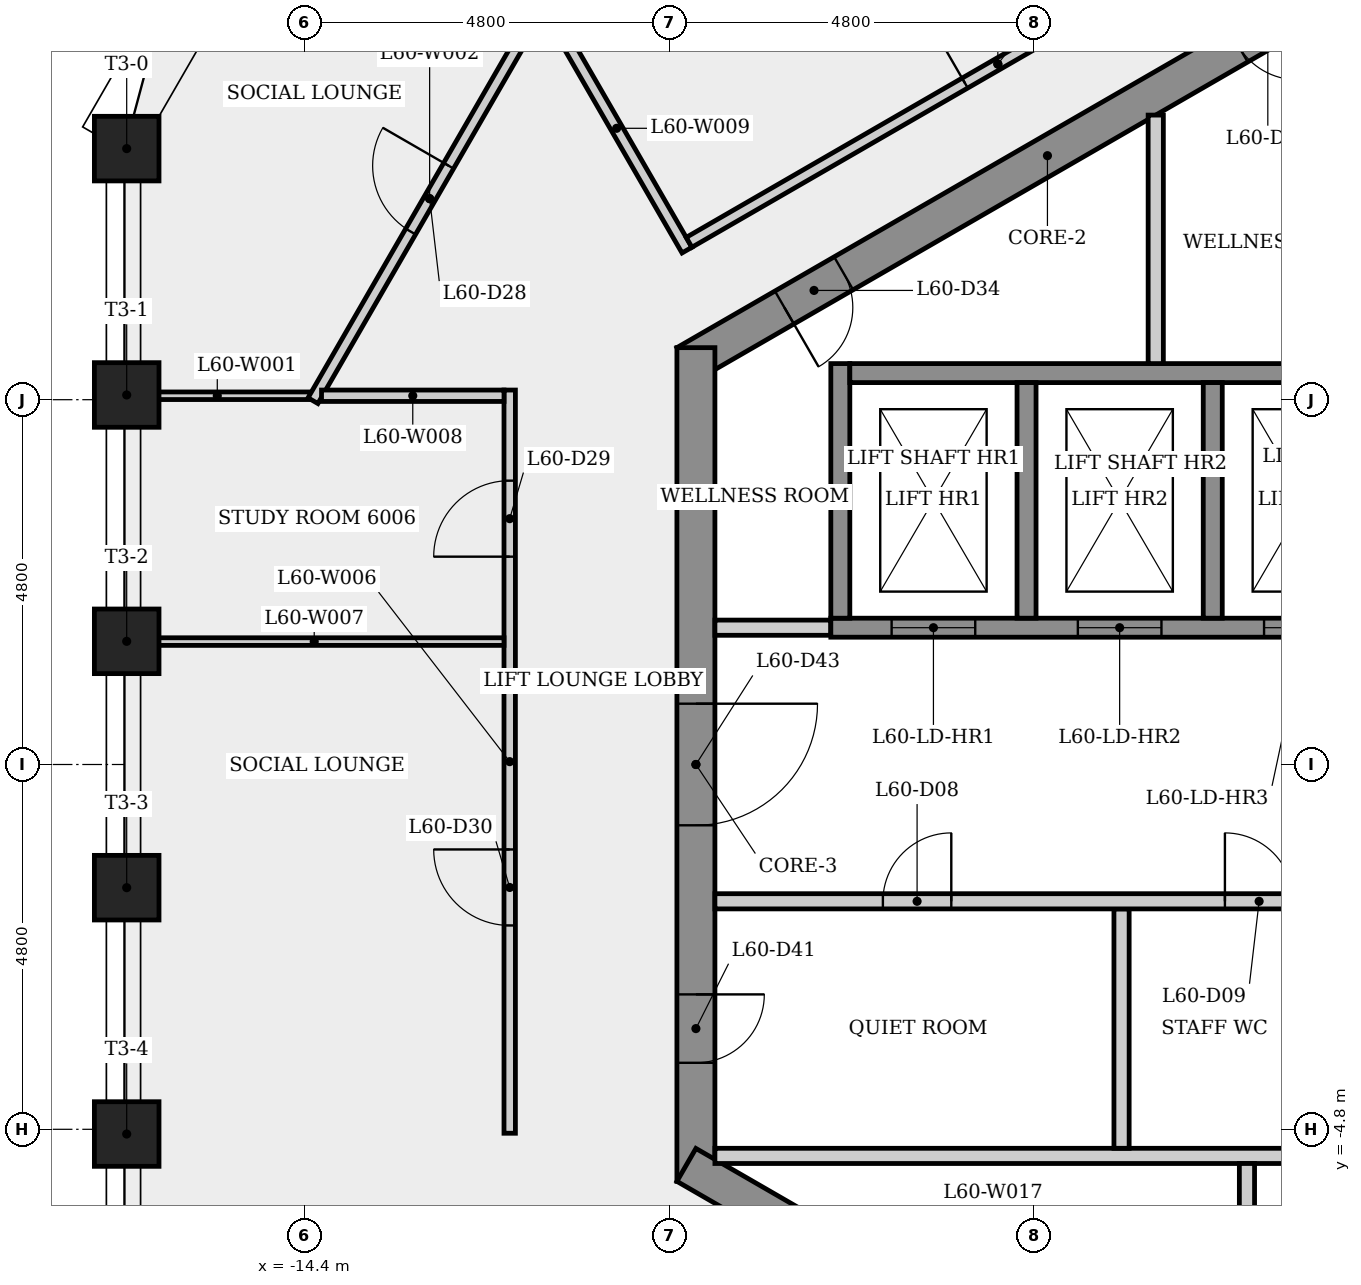
"""IFC4 building model, lengths in metres.
Left out: names, types, materials, properties, quantities, classifications, styles, units other than length and angle.
Written with IfcOpenShell. Run it as: python <this file> out.ifc"""

import sys

from ifc_helpers import new_model, si_unit, direction, frame, frame_2d, origin, origin_2d, place, context, subcontext, project, spatial, rectangle, extrude, element, fill, save


model = new_model("IFC4")
c1 = context("Model", 3, precision=1e-05, world=origin(), true_north=direction((0.0, 1.0)))
c2 = subcontext(c1, "Body", "Model", "MODEL_VIEW")
j1 = project(units=[si_unit("LENGTHUNIT", "METRE"), si_unit("PLANEANGLEUNIT", "RADIAN")], contexts=[c1])
p1 = place(None, origin())
s1 = spatial("IfcSite", under=j1, at=p1, CompositionType="ELEMENT")
p2 = place(p1, origin())
s2 = spatial("IfcBuilding", under=s1, at=p2, CompositionType="ELEMENT")
p3 = place(p2, frame((0.0, 0.0, 225.7)))
s3 = spatial("IfcBuildingStorey", under=s2, at=p3, CompositionType="ELEMENT", Elevation=225.7)
p4 = place(p3, frame((0.125, 10.753, 0.0), z_axis=(0.0, 0.0, 1.0), x_axis=(-0.866023993627, -0.500002442456, 0.0)))
e1 = element("IfcWall", 1, at=p4, inside=s3, PredefinedType="SHEAR", context=c2, shape_type="SweptSolid", body=[
    extrude(rectangle(XDim=10.97, YDim=0.5, at=frame_2d((5.485, 0.0))), origin(), (0.0, 0.0, 1.0), 3.4),
])
p5 = place(p4, frame((8.581, 0.0, 0.0)))
e2 = element("IfcOpeningElement", 2, at=p5, cuts=e1, PredefinedType="OPENING", context=c2, shape_type="SweptSolid", body=[
    extrude(rectangle(XDim=0.9, YDim=2.1, at=frame_2d((0.45, 1.05))), frame((0.0, 0.26, 0.0), z_axis=(0.0, -1.0, 0.0), x_axis=(1.0, 0.0, 0.0)), (0.0, 0.0, 1.0), 0.52),
])
p6 = place(p4, frame((1.687, 0.0, 0.0)))
e3 = element("IfcOpeningElement", 3, at=p6, cuts=e1, PredefinedType="OPENING", context=c2, shape_type="SweptSolid", body=[
    extrude(rectangle(XDim=0.9, YDim=2.1, at=frame_2d((0.45, 1.05))), frame((0.0, 0.26, 0.0), z_axis=(0.0, -1.0, 0.0), x_axis=(1.0, 0.0, 0.0)), (0.0, 0.0, 1.0), 0.52),
])
p7 = place(p3, frame((-9.25, 5.485, 0.0), z_axis=(0.0, 0.0, 1.0), x_axis=(0.0, -1.0, 0.0)))
e4 = element("IfcWall", 4, at=p7, inside=s3, PredefinedType="SHEAR", context=c2, shape_type="SweptSolid", body=[
    extrude(rectangle(XDim=10.97, YDim=0.5, at=frame_2d((5.485, 0.0))), origin(), (0.0, 0.0, 1.0), 3.4),
])
p8 = place(p7, frame((8.51, 0.0, 0.0)))
e5 = element("IfcOpeningElement", 5, at=p8, cuts=e4, PredefinedType="OPENING", context=c2, shape_type="SweptSolid", body=[
    extrude(rectangle(XDim=0.9, YDim=2.1, at=frame_2d((0.45, 1.05))), frame((0.0, 0.26, 0.0), z_axis=(0.0, -1.0, 0.0), x_axis=(1.0, 0.0, 0.0)), (0.0, 0.0, 1.0), 0.52),
])
p9 = place(p7, frame((4.685, 0.0, 0.0)))
e6 = element("IfcOpeningElement", 6, at=p9, cuts=e4, PredefinedType="OPENING", context=c2, shape_type="SweptSolid", body=[
    extrude(rectangle(XDim=1.6, YDim=2.1, at=frame_2d((0.8, 1.05))), frame((0.0, 0.26, 0.0), z_axis=(0.0, -1.0, 0.0), x_axis=(1.0, 0.0, 0.0)), (0.0, 0.0, 1.0), 0.52),
])
p10 = place(p3, frame((-9.375, -5.268, 0.0), z_axis=(0.0, 0.0, 1.0), x_axis=(0.866023993627, -0.500002442456, 0.0)))
e7 = element("IfcWall", 7, at=p10, inside=s3, PredefinedType="SHEAR", context=c2, shape_type="SweptSolid", body=[
    extrude(rectangle(XDim=10.97, YDim=0.5, at=frame_2d((5.485, 0.0))), origin(), (0.0, 0.0, 1.0), 3.4),
])
p11 = place(p10, frame((3.857, 0.0, 0.0)))
e8 = element("IfcOpeningElement", 8, at=p11, cuts=e7, PredefinedType="OPENING", context=c2, shape_type="SweptSolid", body=[
    extrude(rectangle(XDim=0.9, YDim=2.1, at=frame_2d((0.45, 1.05))), frame((0.0, 0.26, 0.0), z_axis=(0.0, -1.0, 0.0), x_axis=(1.0, 0.0, 0.0)), (0.0, 0.0, 1.0), 0.52),
])
p12 = place(p10, frame((9.076, 0.0, 0.0)))
e9 = element("IfcOpeningElement", 9, at=p12, cuts=e7, PredefinedType="OPENING", context=c2, shape_type="SweptSolid", body=[
    extrude(rectangle(XDim=0.9, YDim=2.1, at=frame_2d((0.45, 1.05))), frame((0.0, 0.26, 0.0), z_axis=(0.0, -1.0, 0.0), x_axis=(1.0, 0.0, 0.0)), (0.0, 0.0, 1.0), 0.52),
])
for number, where, z_axis, x_axis in (
    (10, (-16.739, 8.104, 0.0), (0.0, 0.0, 1.0), (-1.0, 0.0, 0.0)),
    (11, (-16.739, 4.862, 0.0), (0.0, 0.0, 1.0), (-1.0, 0.0, 0.0)),
    (12, (-16.739, 1.621, 0.0), (0.0, 0.0, 1.0), (-1.0, 0.0, 0.0)),
    (13, (-16.739, -1.621, 0.0), (0.0, 0.0, 1.0), (-1.0, 0.0, 0.0)),
    (14, (-16.739, -4.862, 0.0), (0.0, 0.0, 1.0), (-1.0, 0.0, 0.0)),
):
    element("IfcColumn", number, at=place(p3, frame(where, z_axis=z_axis, x_axis=x_axis)), inside=s3, PredefinedType="COLUMN", context=c2, shape_type="SweptSolid", body=[
        extrude(rectangle(XDim=0.85, YDim=0.85, at=origin_2d()), origin(), (0.0, 0.0, 1.0), 3.4),
    ])
p13 = place(p3, frame((-14.326, 4.852, 0.0), z_axis=(0.0, 0.0, 1.0), x_axis=(-1.0, 0.0, 0.0)))
e15 = element("IfcWall", 15, at=p13, inside=s3, PredefinedType="PARTITIONING", context=c2, shape_type="SweptSolid", body=[
    extrude(rectangle(XDim=2.443, YDim=0.1, at=frame_2d((1.222, 0.0))), origin(), (0.0, 0.0, 1.0), 3.05),
])
p14 = place(p3, frame((-14.288, 4.787, 0.0), z_axis=(0.0, 0.0, 1.0), x_axis=(0.499984068593, 0.866034601591, 0.0)))
e16 = element("IfcWall", 16, at=p14, inside=s3, PredefinedType="PARTITIONING", context=c2, shape_type="SweptSolid", body=[
    extrude(rectangle(XDim=6.139, YDim=0.15, at=frame_2d((3.07, 0.0))), origin(), (0.0, 0.0, 1.0), 3.05),
])
p15 = place(p14, frame((2.57, 0.0, 0.0)))
e17 = element("IfcOpeningElement", 17, at=p15, cuts=e16, PredefinedType="OPENING", context=c2, shape_type="SweptSolid", body=[
    extrude(rectangle(XDim=1.0, YDim=2.1, at=frame_2d((0.5, 1.05))), frame((0.0, 0.085, 0.0), z_axis=(0.0, -1.0, 0.0), x_axis=(1.0, 0.0, 0.0)), (0.0, 0.0, 1.0), 0.17),
])
p16 = place(p3, frame((-11.7, -4.852, 0.0), z_axis=(0.0, 0.0, 1.0), x_axis=(0.0, 1.0, 0.0)))
e18 = element("IfcWall", 18, at=p16, inside=s3, PredefinedType="PARTITIONING", context=c2, shape_type="SweptSolid", body=[
    extrude(rectangle(XDim=9.779, YDim=0.15, at=frame_2d((4.889, 0.0))), origin(), (0.0, 0.0, 1.0), 3.05),
])
p17 = place(p16, frame((7.586, 0.0, 0.0)))
e19 = element("IfcOpeningElement", 19, at=p17, cuts=e18, PredefinedType="OPENING", context=c2, shape_type="SweptSolid", body=[
    extrude(rectangle(XDim=1.0, YDim=2.1, at=frame_2d((0.5, 1.05))), frame((0.0, 0.085, 0.0), z_axis=(0.0, -1.0, 0.0), x_axis=(1.0, 0.0, 0.0)), (0.0, 0.0, 1.0), 0.17),
])
p18 = place(p16, frame((2.734, 0.0, 0.0)))
e20 = element("IfcOpeningElement", 20, at=p18, cuts=e18, PredefinedType="OPENING", context=c2, shape_type="SweptSolid", body=[
    extrude(rectangle(XDim=1.0, YDim=2.1, at=frame_2d((0.5, 1.05))), frame((0.0, 0.085, 0.0), z_axis=(0.0, -1.0, 0.0), x_axis=(1.0, 0.0, 0.0)), (0.0, 0.0, 1.0), 0.17),
])
p19 = place(p3, frame((-11.775, 1.617, 0.0), z_axis=(0.0, 0.0, 1.0), x_axis=(-1.0, 0.0, 0.0)))
e21 = element("IfcWall", 21, at=p19, inside=s3, PredefinedType="PARTITIONING", context=c2, shape_type="SweptSolid", body=[
    extrude(rectangle(XDim=4.994, YDim=0.1, at=frame_2d((2.497, 0.0))), origin(), (0.0, 0.0, 1.0), 3.05),
])
p20 = place(p3, frame((-11.775, 4.852, 0.0), z_axis=(0.0, 0.0, 1.0), x_axis=(-1.0, 0.0, 0.0)))
e22 = element("IfcWall", 22, at=p20, inside=s3, PredefinedType="PARTITIONING", context=c2, shape_type="SweptSolid", body=[
    extrude(rectangle(XDim=2.401, YDim=0.15, at=frame_2d((1.2, 0.0))), origin(), (0.0, 0.0, 1.0), 3.05),
])
p21 = place(p3, frame((-11.219, 9.974, 0.0), z_axis=(0.0, 0.0, 1.0), x_axis=(0.500040243496, -0.866002167944, 0.0)))
e23 = element("IfcWall", 23, at=p21, inside=s3, PredefinedType="PARTITIONING", context=c2, shape_type="SweptSolid", body=[
    extrude(rectangle(XDim=3.702, YDim=0.15, at=frame_2d((1.851, 0.0))), origin(), (0.0, 0.0, 1.0), 3.05),
])
p22 = place(p3, frame((-9.34, 6.87, 0.0), z_axis=(0.0, 0.0, 1.0), x_axis=(0.866023086118, 0.500004014295, 0.0)))
e24 = element("IfcWall", 24, at=p22, inside=s3, PredefinedType="PARTITIONING", context=c2, shape_type="SweptSolid", body=[
    extrude(rectangle(XDim=9.382, YDim=0.15, at=frame_2d((4.691, 0.0))), origin(), (0.0, 0.0, 1.0), 3.05),
])
p23 = place(p22, frame((4.191, 0.0, 0.0)))
e25 = element("IfcOpeningElement", 25, at=p23, cuts=e24, PredefinedType="OPENING", context=c2, shape_type="SweptSolid", body=[
    extrude(rectangle(XDim=1.0, YDim=2.1, at=frame_2d((0.5, 1.05))), frame((0.0, 0.085, 0.0), z_axis=(0.0, -1.0, 0.0), x_axis=(1.0, 0.0, 0.0)), (0.0, 0.0, 1.0), 0.17),
])
p24 = place(p3, frame((-9.0, 1.8, 0.0), z_axis=(0.0, 0.0, 1.0), x_axis=(1.0, 0.0, 0.0)))
e26 = element("IfcWall", 26, at=p24, inside=s3, PredefinedType="PARTITIONING", context=c2, shape_type="SweptSolid", body=[
    extrude(rectangle(XDim=1.525, YDim=0.2, at=frame_2d((0.763, 0.0))), origin(), (0.0, 0.0, 1.0), 3.05),
])
p25 = place(p3, frame((-9.0, -5.15, 0.0), z_axis=(0.0, 0.0, 1.0), x_axis=(1.0, 0.0, 0.0)))
e27 = element("IfcWall", 27, at=p25, inside=s3, PredefinedType="PARTITIONING", context=c2, shape_type="SweptSolid", body=[
    extrude(rectangle(XDim=11.325, YDim=0.2, at=frame_2d((5.663, 0.0))), origin(), (0.0, 0.0, 1.0), 3.05),
])
p26 = place(p3, frame((-7.475, 1.8, 0.0), z_axis=(0.0, 0.0, 1.0), x_axis=(1.0, 0.0, 0.0)))
e28 = element("IfcWall", 28, at=p26, inside=s3, PredefinedType="SHEAR", context=c2, shape_type="SweptSolid", body=[
    extrude(rectangle(XDim=14.95, YDim=0.25, at=frame_2d((7.475, 0.0))), origin(), (0.0, 0.0, 1.0), 3.05),
])
p27 = place(p26, frame((0.8, 0.0, 0.0)))
e29 = element("IfcOpeningElement", 29, at=p27, cuts=e28, PredefinedType="OPENING", context=c2, shape_type="SweptSolid", body=[
    extrude(rectangle(XDim=1.1, YDim=2.1, at=frame_2d((0.55, 1.05))), frame((0.0, 0.135, 0.0), z_axis=(0.0, -1.0, 0.0), x_axis=(1.0, 0.0, 0.0)), (0.0, 0.0, 1.0), 0.27),
])
p28 = place(p26, frame((3.25, 0.0, 0.0)))
e30 = element("IfcOpeningElement", 30, at=p28, cuts=e28, PredefinedType="OPENING", context=c2, shape_type="SweptSolid", body=[
    extrude(rectangle(XDim=1.1, YDim=2.1, at=frame_2d((0.55, 1.05))), frame((0.0, 0.135, 0.0), z_axis=(0.0, -1.0, 0.0), x_axis=(1.0, 0.0, 0.0)), (0.0, 0.0, 1.0), 0.27),
])
p29 = place(p26, frame((5.7, 0.0, 0.0)))
e31 = element("IfcOpeningElement", 31, at=p29, cuts=e28, PredefinedType="OPENING", context=c2, shape_type="SweptSolid", body=[
    extrude(rectangle(XDim=1.1, YDim=2.1, at=frame_2d((0.55, 1.05))), frame((0.0, 0.135, 0.0), z_axis=(0.0, -1.0, 0.0), x_axis=(1.0, 0.0, 0.0)), (0.0, 0.0, 1.0), 0.27),
])
p30 = place(p26, frame((8.15, 0.0, 0.0)))
e32 = element("IfcOpeningElement", 32, at=p30, cuts=e28, PredefinedType="OPENING", context=c2, shape_type="SweptSolid", body=[
    extrude(rectangle(XDim=1.1, YDim=2.1, at=frame_2d((0.55, 1.05))), frame((0.0, 0.135, 0.0), z_axis=(0.0, -1.0, 0.0), x_axis=(1.0, 0.0, 0.0)), (0.0, 0.0, 1.0), 0.27),
])
p31 = place(p26, frame((10.6, 0.0, 0.0)))
e33 = element("IfcOpeningElement", 33, at=p31, cuts=e28, PredefinedType="OPENING", context=c2, shape_type="SweptSolid", body=[
    extrude(rectangle(XDim=1.1, YDim=2.1, at=frame_2d((0.55, 1.05))), frame((0.0, 0.135, 0.0), z_axis=(0.0, -1.0, 0.0), x_axis=(1.0, 0.0, 0.0)), (0.0, 0.0, 1.0), 0.27),
])
p32 = place(p26, frame((13.05, 0.0, 0.0)))
e34 = element("IfcOpeningElement", 34, at=p32, cuts=e28, PredefinedType="OPENING", context=c2, shape_type="SweptSolid", body=[
    extrude(rectangle(XDim=1.1, YDim=2.1, at=frame_2d((0.55, 1.05))), frame((0.0, 0.135, 0.0), z_axis=(0.0, -1.0, 0.0), x_axis=(1.0, 0.0, 0.0)), (0.0, 0.0, 1.0), 0.27),
])
p33 = place(p3, frame((-7.35, 1.925, 0.0), z_axis=(0.0, 0.0, 1.0), x_axis=(0.0, 1.0, 0.0)))
e35 = element("IfcWall", 35, at=p33, inside=s3, PredefinedType="SHEAR", context=c2, shape_type="SweptSolid", body=[
    extrude(rectangle(XDim=3.35, YDim=0.25, at=frame_2d((1.675, 0.0))), origin(), (0.0, 0.0, 1.0), 3.05),
])
p34 = place(p3, frame((-7.225, 5.15, 0.0), z_axis=(0.0, 0.0, 1.0), x_axis=(1.0, 0.0, 0.0)))
e36 = element("IfcWall", 36, at=p34, inside=s3, PredefinedType="SHEAR", context=c2, shape_type="SweptSolid", body=[
    extrude(rectangle(XDim=14.7, YDim=0.25, at=frame_2d((7.35, 0.0))), origin(), (0.0, 0.0, 1.0), 3.05),
])
p35 = place(p3, frame((-4.9, 5.025, 0.0), z_axis=(0.0, 0.0, 1.0), x_axis=(0.0, -1.0, 0.0)))
e37 = element("IfcWall", 37, at=p35, inside=s3, PredefinedType="SHEAR", context=c2, shape_type="SweptSolid", body=[
    extrude(rectangle(XDim=3.1, YDim=0.25, at=frame_2d((1.55, 0.0))), origin(), (0.0, 0.0, 1.0), 3.4),
])
p36 = place(p3, frame((-3.65, -1.9, 0.0), z_axis=(0.0, 0.0, 1.0), x_axis=(0.0, -1.0, 0.0)))
e38 = element("IfcWall", 38, at=p36, inside=s3, PredefinedType="PARTITIONING", context=c2, shape_type="SweptSolid", body=[
    extrude(rectangle(XDim=3.15, YDim=0.2, at=frame_2d((1.575, 0.0))), origin(), (0.0, 0.0, 1.0), 3.05),
])
p37 = place(p3, frame((-9.0, -1.8, 0.0), z_axis=(0.0, 0.0, 1.0), x_axis=(1.0, 0.0, 0.0)))
e39 = element("IfcWall", 39, at=p37, inside=s3, PredefinedType="PARTITIONING", context=c2, shape_type="SweptSolid", body=[
    extrude(rectangle(XDim=11.325, YDim=0.2, at=frame_2d((5.663, 0.0))), origin(), (0.0, 0.0, 1.0), 3.05),
])
p38 = place(p37, frame((2.21, 0.0, 0.0)))
e40 = element("IfcOpeningElement", 40, at=p38, cuts=e39, PredefinedType="OPENING", context=c2, shape_type="SweptSolid", body=[
    extrude(rectangle(XDim=0.9, YDim=2.1, at=frame_2d((0.45, 1.05))), frame((0.0, 0.11, 0.0), z_axis=(0.0, -1.0, 0.0), x_axis=(1.0, 0.0, 0.0)), (0.0, 0.0, 1.0), 0.22),
])
p39 = place(p37, frame((6.71, 0.0, 0.0)))
e41 = element("IfcOpeningElement", 41, at=p39, cuts=e39, PredefinedType="OPENING", context=c2, shape_type="SweptSolid", body=[
    extrude(rectangle(XDim=0.9, YDim=2.1, at=frame_2d((0.45, 1.05))), frame((0.0, 0.11, 0.0), z_axis=(0.0, -1.0, 0.0), x_axis=(1.0, 0.0, 0.0)), (0.0, 0.0, 1.0), 0.22),
])
p40 = place(p37, frame((9.713, 0.0, 0.0)))
e42 = element("IfcOpeningElement", 42, at=p40, cuts=e39, PredefinedType="OPENING", context=c2, shape_type="SweptSolid", body=[
    extrude(rectangle(XDim=0.9, YDim=2.1, at=frame_2d((0.45, 1.05))), frame((0.0, 0.11, 0.0), z_axis=(0.0, -1.0, 0.0), x_axis=(1.0, 0.0, 0.0)), (0.0, 0.0, 1.0), 0.22),
])
p41 = place(p3, frame((-3.2, 8.545, 0.0), z_axis=(0.0, 0.0, 1.0), x_axis=(0.0, -1.0, 0.0)))
e43 = element("IfcWall", 43, at=p41, inside=s3, PredefinedType="PARTITIONING", context=c2, shape_type="SweptSolid", body=[
    extrude(rectangle(XDim=3.27, YDim=0.2, at=frame_2d((1.635, 0.0))), origin(), (0.0, 0.0, 1.0), 3.05),
])
p42 = place(p3, frame((-2.45, 5.025, 0.0), z_axis=(0.0, 0.0, 1.0), x_axis=(0.0, -1.0, 0.0)))
e44 = element("IfcWall", 44, at=p42, inside=s3, PredefinedType="SHEAR", context=c2, shape_type="SweptSolid", body=[
    extrude(rectangle(XDim=3.1, YDim=0.25, at=frame_2d((1.55, 0.0))), origin(), (0.0, 0.0, 1.0), 3.4),
])
p43 = place(p3, frame((-2.0, -5.25, 0.0), z_axis=(0.0, 0.0, 1.0), x_axis=(0.0, -1.0, 0.0)))
e45 = element("IfcWall", 45, at=p43, inside=s3, PredefinedType="PARTITIONING", context=c2, shape_type="SweptSolid", body=[
    extrude(rectangle(XDim=3.988, YDim=0.2, at=frame_2d((1.994, 0.0))), origin(), (0.0, 0.0, 1.0), 3.05),
])
p44 = place(p27, origin())
e46 = element("IfcDoor", 46, at=p44, inside=s3, OperationType="SLIDING_TO_LEFT", PredefinedType="DOOR", context=c2, shape_type="SweptSolid", body=[
    extrude(rectangle(XDim=1.1, YDim=2.1, at=frame_2d((0.55, 1.05))), frame((0.0, 0.025, 0.0), z_axis=(0.0, -1.0, 0.0), x_axis=(1.0, 0.0, 0.0)), (0.0, 0.0, 1.0), 0.05),
])
fill(e29, e46)
p45 = place(p28, origin())
e47 = element("IfcDoor", 47, at=p45, inside=s3, OperationType="SLIDING_TO_LEFT", PredefinedType="DOOR", context=c2, shape_type="SweptSolid", body=[
    extrude(rectangle(XDim=1.1, YDim=2.1, at=frame_2d((0.55, 1.05))), frame((0.0, 0.025, 0.0), z_axis=(0.0, -1.0, 0.0), x_axis=(1.0, 0.0, 0.0)), (0.0, 0.0, 1.0), 0.05),
])
fill(e30, e47)
p46 = place(p29, origin())
e48 = element("IfcDoor", 48, at=p46, inside=s3, OperationType="SLIDING_TO_LEFT", PredefinedType="DOOR", context=c2, shape_type="SweptSolid", body=[
    extrude(rectangle(XDim=1.1, YDim=2.1, at=frame_2d((0.55, 1.05))), frame((0.0, 0.025, 0.0), z_axis=(0.0, -1.0, 0.0), x_axis=(1.0, 0.0, 0.0)), (0.0, 0.0, 1.0), 0.05),
])
fill(e31, e48)
p47 = place(p38, origin())
e49 = element("IfcDoor", 49, at=p47, inside=s3, OperationType="SINGLE_SWING_RIGHT", PredefinedType="DOOR", context=c2, shape_type="SweptSolid", body=[
    extrude(rectangle(XDim=0.9, YDim=2.1, at=frame_2d((0.45, 1.05))), frame((0.0, 0.025, 0.0), z_axis=(0.0, -1.0, 0.0), x_axis=(1.0, 0.0, 0.0)), (0.0, 0.0, 1.0), 0.05),
])
fill(e40, e49)
p48 = place(p39, origin())
e50 = element("IfcDoor", 50, at=p48, inside=s3, OperationType="SINGLE_SWING_LEFT", PredefinedType="DOOR", context=c2, shape_type="SweptSolid", body=[
    extrude(rectangle(XDim=0.9, YDim=2.1, at=frame_2d((0.45, 1.05))), frame((0.0, 0.025, 0.0), z_axis=(0.0, -1.0, 0.0), x_axis=(1.0, 0.0, 0.0)), (0.0, 0.0, 1.0), 0.05),
])
fill(e41, e50)
p49 = place(p15, origin())
e51 = element("IfcDoor", 51, at=p49, inside=s3, OperationType="SINGLE_SWING_RIGHT", PredefinedType="DOOR", context=c2, shape_type="SweptSolid", body=[
    extrude(rectangle(XDim=1.0, YDim=2.1, at=frame_2d((0.5, 1.05))), frame((0.0, 0.025, 0.0), z_axis=(0.0, -1.0, 0.0), x_axis=(1.0, 0.0, 0.0)), (0.0, 0.0, 1.0), 0.05),
])
fill(e17, e51)
p50 = place(p17, origin())
e52 = element("IfcDoor", 52, at=p50, inside=s3, OperationType="SINGLE_SWING_LEFT", PredefinedType="DOOR", context=c2, shape_type="SweptSolid", body=[
    extrude(rectangle(XDim=1.0, YDim=2.1, at=frame_2d((0.5, 1.05))), frame((0.0, 0.025, 0.0), z_axis=(0.0, -1.0, 0.0), x_axis=(1.0, 0.0, 0.0)), (0.0, 0.0, 1.0), 0.05),
])
fill(e19, e52)
p51 = place(p18, origin())
e53 = element("IfcDoor", 53, at=p51, inside=s3, OperationType="SINGLE_SWING_RIGHT", PredefinedType="DOOR", context=c2, shape_type="SweptSolid", body=[
    extrude(rectangle(XDim=1.0, YDim=2.1, at=frame_2d((0.5, 1.05))), frame((0.0, 0.025, 0.0), z_axis=(0.0, -1.0, 0.0), x_axis=(1.0, 0.0, 0.0)), (0.0, 0.0, 1.0), 0.05),
])
fill(e20, e53)
p52 = place(p23, origin())
e54 = element("IfcDoor", 54, at=p52, inside=s3, OperationType="SINGLE_SWING_LEFT", PredefinedType="DOOR", context=c2, shape_type="SweptSolid", body=[
    extrude(rectangle(XDim=1.0, YDim=2.1, at=frame_2d((0.5, 1.05))), frame((0.0, 0.025, 0.0), z_axis=(0.0, -1.0, 0.0), x_axis=(1.0, 0.0, 0.0)), (0.0, 0.0, 1.0), 0.05),
])
fill(e25, e54)
p53 = place(p5, origin())
e55 = element("IfcDoor", 55, at=p53, inside=s3, OperationType="SINGLE_SWING_RIGHT", PredefinedType="DOOR", context=c2, shape_type="SweptSolid", body=[
    extrude(rectangle(XDim=0.9, YDim=2.1, at=frame_2d((0.45, 1.05))), frame((0.0, 0.025, 0.0), z_axis=(0.0, -1.0, 0.0), x_axis=(1.0, 0.0, 0.0)), (0.0, 0.0, 1.0), 0.05),
])
fill(e2, e55)
p54 = place(p8, origin())
e56 = element("IfcDoor", 56, at=p54, inside=s3, OperationType="SINGLE_SWING_LEFT", PredefinedType="DOOR", context=c2, shape_type="SweptSolid", body=[
    extrude(rectangle(XDim=0.9, YDim=2.1, at=frame_2d((0.45, 1.05))), frame((0.0, 0.025, 0.0), z_axis=(0.0, -1.0, 0.0), x_axis=(1.0, 0.0, 0.0)), (0.0, 0.0, 1.0), 0.05),
])
fill(e5, e56)
p55 = place(p9, origin())
e57 = element("IfcDoor", 57, at=p55, inside=s3, OperationType="SINGLE_SWING_LEFT", PredefinedType="DOOR", context=c2, shape_type="SweptSolid", body=[
    extrude(rectangle(XDim=1.6, YDim=2.1, at=frame_2d((0.8, 1.05))), frame((0.0, 0.025, 0.0), z_axis=(0.0, -1.0, 0.0), x_axis=(1.0, 0.0, 0.0)), (0.0, 0.0, 1.0), 0.05),
])
fill(e6, e57)
save(model, sys.argv[1])
